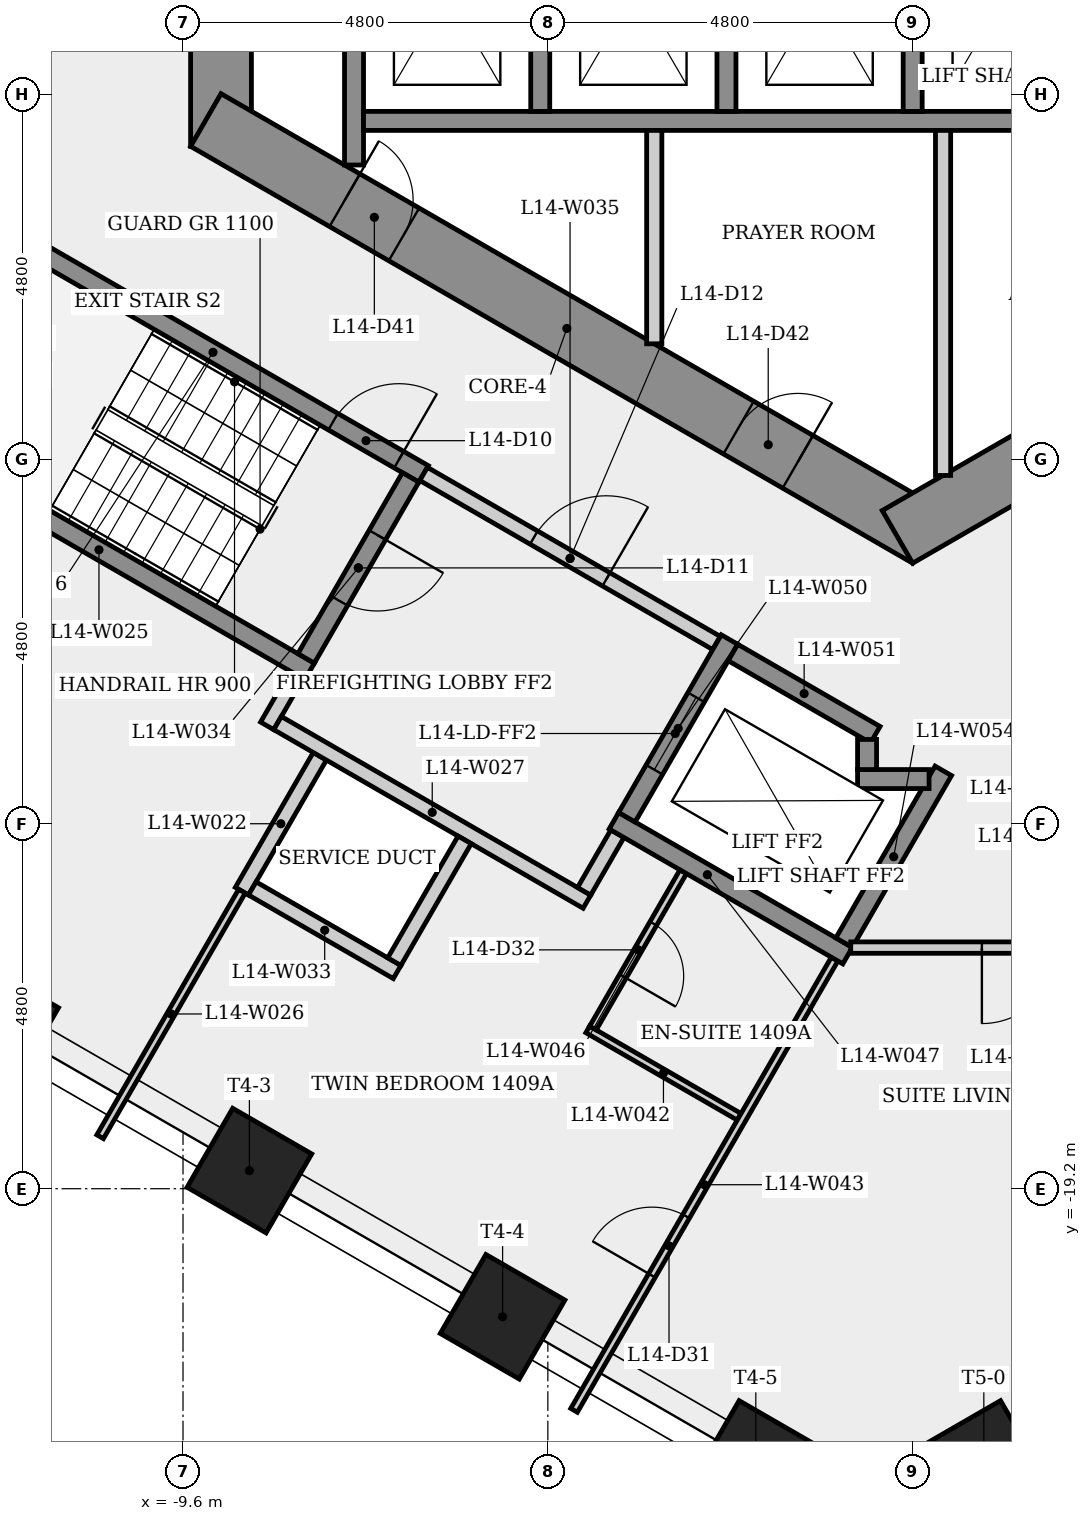
"""IFC4 building model, lengths in metres.
Left out: names, types, materials, properties, quantities, classifications, styles, units other than length and angle.
Written with IfcOpenShell. Run it as: python <this file> out.ifc"""

import sys

from ifc_helpers import new_model, si_unit, direction, frame, frame_2d, origin, origin_2d, place, context, subcontext, project, spatial, rectangle, extrude, element, fill, save


model = new_model("IFC4")
c1 = context("Model", 3, precision=1e-05, world=origin(), true_north=direction((0.0, 1.0)))
c2 = subcontext(c1, "Body", "Model", "MODEL_VIEW")
j1 = project(units=[si_unit("LENGTHUNIT", "METRE"), si_unit("PLANEANGLEUNIT", "RADIAN")], contexts=[c1])
p1 = place(None, origin())
s1 = spatial("IfcSite", under=j1, at=p1, CompositionType="ELEMENT")
p2 = place(p1, origin())
s2 = spatial("IfcBuilding", under=s1, at=p2, CompositionType="ELEMENT")
p3 = place(p2, frame((0.0, 0.0, 56.1)))
s3 = spatial("IfcBuildingStorey", under=s2, at=p3, CompositionType="ELEMENT", Elevation=56.1)
p4 = place(p3, frame((-9.1, 5.485, 0.0), z_axis=(0.0, 0.0, 1.0), x_axis=(0.0, -1.0, 0.0)))
e1 = element("IfcWall", 1, at=p4, inside=s3, PredefinedType="SHEAR", context=c2, shape_type="SweptSolid", body=[
    extrude(rectangle(XDim=10.97, YDim=0.8, at=frame_2d((5.485, 0.0))), origin(), (0.0, 0.0, 1.0), 3.4),
])
p5 = place(p4, frame((4.685, 0.0, 0.0)))
e2 = element("IfcOpeningElement", 2, at=p5, cuts=e1, PredefinedType="OPENING", context=c2, shape_type="SweptSolid", body=[
    extrude(rectangle(XDim=1.6, YDim=2.1, at=frame_2d((0.8, 1.05))), frame((0.0, 0.41, 0.0), z_axis=(0.0, -1.0, 0.0), x_axis=(1.0, 0.0, 0.0)), (0.0, 0.0, 1.0), 0.82),
])
p6 = place(p3, frame((-9.3, -5.138, 0.0), z_axis=(0.0, 0.0, 1.0), x_axis=(0.866023993627, -0.500002442456, 0.0)))
e3 = element("IfcWall", 3, at=p6, inside=s3, PredefinedType="SHEAR", context=c2, shape_type="SweptSolid", body=[
    extrude(rectangle(XDim=10.97, YDim=0.8, at=frame_2d((5.485, 0.0))), origin(), (0.0, 0.0, 1.0), 3.4),
])
p7 = place(p6, frame((2.11, 0.0, 0.0)))
e4 = element("IfcOpeningElement", 4, at=p7, cuts=e3, PredefinedType="OPENING", context=c2, shape_type="SweptSolid", body=[
    extrude(rectangle(XDim=0.9, YDim=2.1, at=frame_2d((0.45, 1.05))), frame((0.0, 0.41, 0.0), z_axis=(0.0, -1.0, 0.0), x_axis=(1.0, 0.0, 0.0)), (0.0, 0.0, 1.0), 0.82),
])
p8 = place(p6, frame((8.094, 0.0, 0.0)))
e5 = element("IfcOpeningElement", 5, at=p8, cuts=e3, PredefinedType="OPENING", context=c2, shape_type="SweptSolid", body=[
    extrude(rectangle(XDim=0.9, YDim=2.1, at=frame_2d((0.45, 1.05))), frame((0.0, 0.41, 0.0), z_axis=(0.0, -1.0, 0.0), x_axis=(1.0, 0.0, 0.0)), (0.0, 0.0, 1.0), 0.82),
])
p9 = place(p3, frame((-0.2, -10.623, 0.0), z_axis=(0.0, 0.0, 1.0), x_axis=(0.866023993627, 0.500002442456, 0.0)))
e6 = element("IfcWall", 6, at=p9, inside=s3, PredefinedType="SHEAR", context=c2, shape_type="SweptSolid", body=[
    extrude(rectangle(XDim=10.97, YDim=0.8, at=frame_2d((5.485, 0.0))), origin(), (0.0, 0.0, 1.0), 3.4),
])
p10 = place(p9, frame((6.877, 0.0, 0.0)))
e7 = element("IfcOpeningElement", 7, at=p10, cuts=e6, PredefinedType="OPENING", context=c2, shape_type="SweptSolid", body=[
    extrude(rectangle(XDim=0.9, YDim=2.1, at=frame_2d((0.45, 1.05))), frame((0.0, 0.41, 0.0), z_axis=(0.0, -1.0, 0.0), x_axis=(1.0, 0.0, 0.0)), (0.0, 0.0, 1.0), 0.82),
])
for number, where, z_axis, x_axis in (
    (8, (-12.058, -17.038, 0.0), (0.0, 0.0, 1.0), (-0.5, -0.866, 0.0)),
    (9, (-8.727, -18.962, 0.0), (0.0, 0.0, 1.0), (-0.5, -0.866, 0.0)),
    (10, (-5.395, -20.885, 0.0), (0.0, 0.0, 1.0), (-0.5, -0.866, 0.0)),
    (11, (-2.064, -22.808, 0.0), (0.0, 0.0, 1.0), (-0.5, -0.866, 0.0)),
    (12, (0.936, -22.808, 0.0), (0.0, 0.0, 1.0), (0.5, -0.866, 0.0)),
):
    element("IfcColumn", number, at=place(p3, frame(where, z_axis=z_axis, x_axis=x_axis)), inside=s3, PredefinedType="COLUMN", context=c2, shape_type="SweptSolid", body=[
        extrude(rectangle(XDim=1.2, YDim=1.2, at=origin_2d()), origin(), (0.0, 0.0, 1.0), 3.4),
    ])
p11 = place(p3, frame((-11.977, -6.595, 0.0), z_axis=(0.0, 0.0, 1.0), x_axis=(0.866025499775, -0.499999833739, 0.0)))
e13 = element("IfcWall", 13, at=p11, inside=s3, PredefinedType="SHEAR", context=c2, shape_type="SweptSolid", body=[
    extrude(rectangle(XDim=6.4, YDim=0.25, at=frame_2d((3.2, 0.0))), origin(), (0.0, 0.0, 1.0), 3.05),
])
p12 = place(p11, frame((5.025, 0.0, 0.0)))
e14 = element("IfcOpeningElement", 14, at=p12, cuts=e13, PredefinedType="OPENING", context=c2, shape_type="SweptSolid", body=[
    extrude(rectangle(XDim=1.0, YDim=2.1, at=frame_2d((0.5, 1.05))), frame((0.0, 0.135, 0.0), z_axis=(0.0, -1.0, 0.0), x_axis=(1.0, 0.0, 0.0)), (0.0, 0.0, 1.0), 0.27),
])
p13 = place(p3, frame((-8.825, -15.285, 0.0), z_axis=(0.0, 0.0, 1.0), x_axis=(0.499956128963, 0.866050731258, 0.0)))
e15 = element("IfcWall", 15, at=p13, inside=s3, PredefinedType="PLUMBINGWALL", context=c2, shape_type="SweptSolid", body=[
    extrude(rectangle(XDim=2.05, YDim=0.2, at=frame_2d((1.025, 0.0))), origin(), (0.0, 0.0, 1.0), 3.05),
])
p14 = place(p3, frame((-8.493, -13.11, 0.0), z_axis=(0.0, 0.0, 1.0), x_axis=(0.500067724834, 0.865986299303, 0.0)))
e16 = element("IfcWall", 16, at=p14, inside=s3, PredefinedType="PARTITIONING", context=c2, shape_type="SweptSolid", body=[
    extrude(rectangle(XDim=0.775, YDim=0.2, at=frame_2d((0.388, 0.0))), origin(), (0.0, 0.0, 1.0), 3.05),
])
p15 = place(p3, frame((-7.935, -12.393, 0.0), z_axis=(0.0, 0.0, 1.0), x_axis=(-0.866025499775, 0.499999833739, 0.0)))
e17 = element("IfcWall", 17, at=p15, inside=s3, PredefinedType="SHEAR", context=c2, shape_type="SweptSolid", body=[
    extrude(rectangle(XDim=6.4, YDim=0.25, at=frame_2d((3.2, 0.0))), origin(), (0.0, 0.0, 1.0), 3.05),
])
p16 = place(p3, frame((-10.69, -18.516, 0.0), z_axis=(0.0, 0.0, 1.0), x_axis=(0.49999626415, 0.866027560668, 0.0)))
e18 = element("IfcWall", 18, at=p16, inside=s3, PredefinedType="PARTITIONING", context=c2, shape_type="SweptSolid", body=[
    extrude(rectangle(XDim=3.73, YDim=0.1, at=frame_2d((1.865, 0.0))), origin(), (0.0, 0.0, 1.0), 3.05),
])
p17 = place(p3, frame((-8.356, -13.073, 0.0), z_axis=(0.0, 0.0, 1.0), x_axis=(0.866038532462, -0.499977259774, 0.0)))
e19 = element("IfcWall", 19, at=p17, inside=s3, PredefinedType="PARTITIONING", context=c2, shape_type="SweptSolid", body=[
    extrude(rectangle(XDim=4.7, YDim=0.2, at=frame_2d((2.35, 0.0))), origin(), (0.0, 0.0, 1.0), 3.05),
])
p18 = place(p3, frame((-7.35, -5.73, 0.0), z_axis=(0.0, 0.0, 1.0), x_axis=(0.0, 1.0, 0.0)))
e20 = element("IfcWall", 20, at=p18, inside=s3, PredefinedType="SHEAR", context=c2, shape_type="SweptSolid", body=[
    extrude(rectangle(XDim=4.055, YDim=0.25, at=frame_2d((2.028, 0.0))), origin(), (0.0, 0.0, 1.0), 3.05),
])
p19 = place(p3, frame((-6.783, -16.349, 0.0), z_axis=(0.0, 0.0, 1.0), x_axis=(-0.866008176907, 0.50002983664, 0.0)))
e21 = element("IfcWall", 21, at=p19, inside=s3, PredefinedType="PLUMBINGWALL", context=c2, shape_type="SweptSolid", body=[
    extrude(rectangle(XDim=2.2, YDim=0.2, at=frame_2d((1.1, 0.0))), origin(), (0.0, 0.0, 1.0), 3.05),
])
p20 = place(p3, frame((-6.605, -9.841, 0.0), z_axis=(0.0, 0.0, 1.0), x_axis=(-0.499996545922, -0.866027397988, 0.0)))
e22 = element("IfcWall", 22, at=p20, inside=s3, PredefinedType="SHEAR", context=c2, shape_type="SweptSolid", body=[
    extrude(rectangle(XDim=2.75, YDim=0.25, at=frame_2d((1.375, 0.0))), origin(), (0.0, 0.0, 1.0), 3.05),
])
p21 = place(p20, frame((0.875, 0.0, 0.0)))
e23 = element("IfcOpeningElement", 23, at=p21, cuts=e22, PredefinedType="OPENING", context=c2, shape_type="SweptSolid", body=[
    extrude(rectangle(XDim=1.0, YDim=2.1, at=frame_2d((0.5, 1.05))), frame((0.0, 0.135, 0.0), z_axis=(0.0, -1.0, 0.0), x_axis=(1.0, 0.0, 0.0)), (0.0, 0.0, 1.0), 0.27),
])
p22 = place(p3, frame((-6.435, -9.795, 0.0), z_axis=(0.0, 0.0, 1.0), x_axis=(0.866012907634, -0.500021643343, 0.0)))
e24 = element("IfcWall", 24, at=p22, inside=s3, PredefinedType="PARTITIONING", context=c2, shape_type="SweptSolid", body=[
    extrude(rectangle(XDim=4.45, YDim=0.2, at=frame_2d((2.225, 0.0))), origin(), (0.0, 0.0, 1.0), 3.05),
])
p23 = place(p22, frame((1.675, 0.0, 0.0)))
e25 = element("IfcOpeningElement", 25, at=p23, cuts=e24, PredefinedType="OPENING", context=c2, shape_type="SweptSolid", body=[
    extrude(rectangle(XDim=1.1, YDim=2.1, at=frame_2d((0.55, 1.05))), frame((0.0, 0.11, 0.0), z_axis=(0.0, -1.0, 0.0), x_axis=(1.0, 0.0, 0.0)), (0.0, 0.0, 1.0), 0.22),
])
p24 = place(p3, frame((-5.895, -14.61, 0.0), z_axis=(0.0, 0.0, 1.0), x_axis=(-0.500042316284, -0.866000971088, 0.0)))
e26 = element("IfcWall", 26, at=p24, inside=s3, PredefinedType="PLUMBINGWALL", context=c2, shape_type="SweptSolid", body=[
    extrude(rectangle(XDim=1.85, YDim=0.2, at=frame_2d((0.925, 0.0))), origin(), (0.0, 0.0, 1.0), 3.05),
])
p25 = place(p3, frame((-7.225, -5.15, 0.0), z_axis=(0.0, 0.0, 1.0), x_axis=(1.0, 0.0, 0.0)))
e27 = element("IfcWall", 27, at=p25, inside=s3, PredefinedType="SHEAR", context=c2, shape_type="SweptSolid", body=[
    extrude(rectangle(XDim=14.7, YDim=0.25, at=frame_2d((7.35, 0.0))), origin(), (0.0, 0.0, 1.0), 3.05),
])
p26 = place(p3, frame((-4.9, -1.925, 0.0), z_axis=(0.0, 0.0, 1.0), x_axis=(0.0, -1.0, 0.0)))
e28 = element("IfcWall", 28, at=p26, inside=s3, PredefinedType="SHEAR", context=c2, shape_type="SweptSolid", body=[
    extrude(rectangle(XDim=3.1, YDim=0.25, at=frame_2d((1.55, 0.0))), origin(), (0.0, 0.0, 1.0), 3.4),
])
p27 = place(p3, frame((-4.275, -17.104, 0.0), z_axis=(0.0, 0.0, 1.0), x_axis=(0.866053019151, -0.499952165731, 0.0)))
e29 = element("IfcWall", 29, at=p27, inside=s3, PredefinedType="PARTITIONING", context=c2, shape_type="SweptSolid", body=[
    extrude(rectangle(XDim=2.3, YDim=0.1, at=frame_2d((1.15, 0.0))), origin(), (0.0, 0.0, 1.0), 3.05),
])
p28 = place(p3, frame((-4.455, -22.116, 0.0), z_axis=(0.0, 0.0, 1.0), x_axis=(0.499984476993, 0.866034365811, 0.0)))
e30 = element("IfcWall", 30, at=p28, inside=s3, PredefinedType="PARTITIONING", context=c2, shape_type="SweptSolid", body=[
    extrude(rectangle(XDim=6.856, YDim=0.1, at=frame_2d((3.428, 0.0))), origin(), (0.0, 0.0, 1.0), 3.05),
])
p29 = place(p28, frame((2.048, 0.0, 0.0)))
e31 = element("IfcOpeningElement", 31, at=p29, cuts=e30, PredefinedType="OPENING", context=c2, shape_type="SweptSolid", body=[
    extrude(rectangle(XDim=0.9, YDim=2.1, at=frame_2d((0.45, 1.05))), frame((0.0, 0.06, 0.0), z_axis=(0.0, -1.0, 0.0), x_axis=(1.0, 0.0, 0.0)), (0.0, 0.0, 1.0), 0.12),
])
p30 = place(p3, frame((-3.885, -14.529, 0.0), z_axis=(0.0, 0.0, 1.0), x_axis=(-0.499859285417, -0.866106630146, 0.0)))
e32 = element("IfcWall", 32, at=p30, inside=s3, PredefinedType="PARTITIONING", context=c2, shape_type="SweptSolid", body=[
    extrude(rectangle(XDim=0.875, YDim=0.2, at=frame_2d((0.438, 0.0))), origin(), (0.0, 0.0, 1.0), 3.05),
])
p31 = place(p3, frame((-3.4, -5.275, 0.0), z_axis=(0.0, 0.0, 1.0), x_axis=(0.0, -1.0, 0.0)))
e33 = element("IfcWall", 33, at=p31, inside=s3, PredefinedType="PARTITIONING", context=c2, shape_type="SweptSolid", body=[
    extrude(rectangle(XDim=2.808, YDim=0.2, at=frame_2d((1.404, 0.0))), origin(), (0.0, 0.0, 1.0), 3.05),
])
p32 = place(p3, frame((-3.019, -15.029, 0.0), z_axis=(0.0, 0.0, 1.0), x_axis=(-0.499986429846, -0.866033238375, 0.0)))
e34 = element("IfcWall", 34, at=p32, inside=s3, PredefinedType="PARTITIONING", context=c2, shape_type="SweptSolid", body=[
    extrude(rectangle(XDim=2.375, YDim=0.1, at=frame_2d((1.188, 0.0))), origin(), (0.0, 0.0, 1.0), 3.05),
])
p33 = place(p32, frame((0.788, 0.0, 0.0)))
e35 = element("IfcOpeningElement", 35, at=p33, cuts=e34, PredefinedType="OPENING", context=c2, shape_type="SweptSolid", body=[
    extrude(rectangle(XDim=0.8, YDim=2.1, at=frame_2d((0.4, 1.05))), frame((0.0, 0.06, 0.0), z_axis=(0.0, -1.0, 0.0), x_axis=(1.0, 0.0, 0.0)), (0.0, 0.0, 1.0), 0.12),
])
p34 = place(p3, frame((-3.931, -14.358, 0.0), z_axis=(0.0, 0.0, 1.0), x_axis=(0.8660424351, -0.499970499736, 0.0)))
e36 = element("IfcWall", 36, at=p34, inside=s3, PredefinedType="SHEAR", context=c2, shape_type="SweptSolid", body=[
    extrude(rectangle(XDim=3.55, YDim=0.25, at=frame_2d((1.775, 0.0))), origin(), (0.0, 0.0, 1.0), 3.05),
])
p35 = place(p3, frame((-2.41, -11.974, 0.0), z_axis=(0.0, 0.0, 1.0), x_axis=(-0.50000943426, -0.866019956843, 0.0)))
e37 = element("IfcWall", 37, at=p35, inside=s3, PredefinedType="SHEAR", context=c2, shape_type="SweptSolid", body=[
    extrude(rectangle(XDim=2.7, YDim=0.25, at=frame_2d((1.35, 0.0))), origin(), (0.0, 0.0, 1.0), 3.05),
])
p36 = place(p35, frame((0.877, 0.0, 0.0)))
e38 = element("IfcOpeningElement", 38, at=p36, cuts=e37, PredefinedType="OPENING", context=c2, shape_type="SweptSolid", body=[
    extrude(rectangle(XDim=1.1, YDim=2.1, at=frame_2d((0.55, 1.05))), frame((0.0, 0.135, 0.0), z_axis=(0.0, -1.0, 0.0), x_axis=(1.0, 0.0, 0.0)), (0.0, 0.0, 1.0), 0.27),
])
p37 = place(p3, frame((-2.364, -12.145, 0.0), z_axis=(0.0, 0.0, 1.0), x_axis=(0.86603892542, -0.499976579108, 0.0)))
e39 = element("IfcWall", 39, at=p37, inside=s3, PredefinedType="SHEAR", context=c2, shape_type="SweptSolid", body=[
    extrude(rectangle(XDim=2.162, YDim=0.25, at=frame_2d((1.081, 0.0))), origin(), (0.0, 0.0, 1.0), 3.05),
])
p38 = place(p3, frame((-2.45, -1.925, 0.0), z_axis=(0.0, 0.0, 1.0), x_axis=(0.0, -1.0, 0.0)))
e40 = element("IfcWall", 40, at=p38, inside=s3, PredefinedType="SHEAR", context=c2, shape_type="SweptSolid", body=[
    extrude(rectangle(XDim=3.1, YDim=0.25, at=frame_2d((1.55, 0.0))), origin(), (0.0, 0.0, 1.0), 3.4),
])
p39 = place(p3, frame((-0.902, -15.962, 0.0), z_axis=(0.0, 0.0, 1.0), x_axis=(0.499981517636, 0.866036074319, 0.0)))
e41 = element("IfcWall", 41, at=p39, inside=s3, PredefinedType="SHEAR", context=c2, shape_type="SweptSolid", body=[
    extrude(rectangle(XDim=2.61, YDim=0.25, at=frame_2d((1.305, 0.0))), origin(), (0.0, 0.0, 1.0), 3.05),
])
p40 = place(p3, frame((-0.725, -13.81, 0.0), z_axis=(0.0, 0.0, 1.0), x_axis=(1.0, 0.0, 0.0)))
e42 = element("IfcWall", 42, at=p40, inside=s3, PredefinedType="SHEAR", context=c2, shape_type="SweptSolid", body=[
    extrude(rectangle(XDim=0.941, YDim=0.25, at=frame_2d((0.47, 0.0))), origin(), (0.0, 0.0, 1.0), 3.4),
])
p41 = place(p3, frame((-0.6, -13.289, 0.0), z_axis=(0.0, 0.0, 1.0), x_axis=(0.0, -1.0, 0.0)))
e43 = element("IfcWall", 43, at=p41, inside=s3, PredefinedType="SHEAR", context=c2, shape_type="SweptSolid", body=[
    extrude(rectangle(XDim=0.396, YDim=0.25, at=frame_2d((0.198, 0.0))), origin(), (0.0, 0.0, 1.0), 3.4),
])
p42 = place(p3, frame((0.0, -1.925, 0.0), z_axis=(0.0, 0.0, 1.0), x_axis=(0.0, -1.0, 0.0)))
e44 = element("IfcWall", 44, at=p42, inside=s3, PredefinedType="SHEAR", context=c2, shape_type="SweptSolid", body=[
    extrude(rectangle(XDim=3.1, YDim=0.25, at=frame_2d((1.55, 0.0))), origin(), (0.0, 0.0, 1.0), 3.4),
])
p43 = place(p3, frame((0.4, -5.275, 0.0), z_axis=(0.0, 0.0, 1.0), x_axis=(0.0, -1.0, 0.0)))
e45 = element("IfcWall", 45, at=p43, inside=s3, PredefinedType="PARTITIONING", context=c2, shape_type="SweptSolid", body=[
    extrude(rectangle(XDim=4.54, YDim=0.2, at=frame_2d((2.27, 0.0))), origin(), (0.0, 0.0, 1.0), 3.05),
])
p44 = place(p3, frame((3.636, -16.028, 0.0), z_axis=(0.0, 0.0, 1.0), x_axis=(-1.0, 0.0, 0.0)))
e46 = element("IfcWall", 46, at=p44, inside=s3, PredefinedType="PARTITIONING", context=c2, shape_type="SweptSolid", body=[
    extrude(rectangle(XDim=4.451, YDim=0.15, at=frame_2d((2.225, 0.0))), origin(), (0.0, 0.0, 1.0), 3.05),
])
p45 = place(p44, frame((1.725, 0.0, 0.0)))
e47 = element("IfcOpeningElement", 47, at=p45, cuts=e46, PredefinedType="OPENING", context=c2, shape_type="SweptSolid", body=[
    extrude(rectangle(XDim=1.0, YDim=2.1, at=frame_2d((0.5, 1.05))), frame((0.0, 0.085, 0.0), z_axis=(0.0, -1.0, 0.0), x_axis=(1.0, 0.0, 0.0)), (0.0, 0.0, 1.0), 0.17),
])
p46 = place(p12, origin())
e48 = element("IfcDoor", 48, at=p46, inside=s3, OperationType="SINGLE_SWING_RIGHT", PredefinedType="DOOR", context=c2, shape_type="SweptSolid", body=[
    extrude(rectangle(XDim=1.0, YDim=2.1, at=frame_2d((0.5, 1.05))), frame((0.0, 0.025, 0.0), z_axis=(0.0, -1.0, 0.0), x_axis=(1.0, 0.0, 0.0)), (0.0, 0.0, 1.0), 0.05),
])
fill(e14, e48)
p47 = place(p21, origin())
e49 = element("IfcDoor", 49, at=p47, inside=s3, OperationType="SINGLE_SWING_LEFT", PredefinedType="DOOR", context=c2, shape_type="SweptSolid", body=[
    extrude(rectangle(XDim=1.0, YDim=2.1, at=frame_2d((0.5, 1.05))), frame((0.0, 0.025, 0.0), z_axis=(0.0, -1.0, 0.0), x_axis=(1.0, 0.0, 0.0)), (0.0, 0.0, 1.0), 0.05),
])
fill(e23, e49)
p48 = place(p23, origin())
e50 = element("IfcDoor", 50, at=p48, inside=s3, OperationType="SINGLE_SWING_RIGHT", PredefinedType="DOOR", context=c2, shape_type="SweptSolid", body=[
    extrude(rectangle(XDim=1.1, YDim=2.1, at=frame_2d((0.55, 1.05))), frame((0.0, 0.025, 0.0), z_axis=(0.0, -1.0, 0.0), x_axis=(1.0, 0.0, 0.0)), (0.0, 0.0, 1.0), 0.05),
])
fill(e25, e50)
p49 = place(p36, origin())
e51 = element("IfcDoor", 51, at=p49, inside=s3, OperationType="SLIDING_TO_LEFT", PredefinedType="DOOR", context=c2, shape_type="SweptSolid", body=[
    extrude(rectangle(XDim=1.1, YDim=2.1, at=frame_2d((0.55, 1.05))), frame((0.0, 0.025, 0.0), z_axis=(0.0, -1.0, 0.0), x_axis=(1.0, 0.0, 0.0)), (0.0, 0.0, 1.0), 0.05),
])
fill(e38, e51)
p50 = place(p45, origin())
e52 = element("IfcDoor", 52, at=p50, inside=s3, OperationType="SINGLE_SWING_RIGHT", PredefinedType="DOOR", context=c2, shape_type="SweptSolid", body=[
    extrude(rectangle(XDim=1.0, YDim=2.1, at=frame_2d((0.5, 1.05))), frame((0.0, 0.025, 0.0), z_axis=(0.0, -1.0, 0.0), x_axis=(1.0, 0.0, 0.0)), (0.0, 0.0, 1.0), 0.05),
])
fill(e47, e52)
p51 = place(p29, origin())
e53 = element("IfcDoor", 53, at=p51, inside=s3, OperationType="SINGLE_SWING_LEFT", PredefinedType="DOOR", context=c2, shape_type="SweptSolid", body=[
    extrude(rectangle(XDim=0.9, YDim=2.1, at=frame_2d((0.45, 1.05))), frame((0.0, 0.025, 0.0), z_axis=(0.0, -1.0, 0.0), x_axis=(1.0, 0.0, 0.0)), (0.0, 0.0, 1.0), 0.05),
])
fill(e31, e53)
p52 = place(p33, origin())
e54 = element("IfcDoor", 54, at=p52, inside=s3, OperationType="SINGLE_SWING_RIGHT", PredefinedType="DOOR", context=c2, shape_type="SweptSolid", body=[
    extrude(rectangle(XDim=0.8, YDim=2.1, at=frame_2d((0.4, 1.05))), frame((0.0, 0.025, 0.0), z_axis=(0.0, -1.0, 0.0), x_axis=(1.0, 0.0, 0.0)), (0.0, 0.0, 1.0), 0.05),
])
fill(e35, e54)
p53 = place(p7, origin())
e55 = element("IfcDoor", 55, at=p53, inside=s3, OperationType="SINGLE_SWING_LEFT", PredefinedType="DOOR", context=c2, shape_type="SweptSolid", body=[
    extrude(rectangle(XDim=0.9, YDim=2.1, at=frame_2d((0.45, 1.05))), frame((0.0, 0.025, 0.0), z_axis=(0.0, -1.0, 0.0), x_axis=(1.0, 0.0, 0.0)), (0.0, 0.0, 1.0), 0.05),
])
fill(e4, e55)
p54 = place(p8, origin())
e56 = element("IfcDoor", 56, at=p54, inside=s3, OperationType="SINGLE_SWING_RIGHT", PredefinedType="DOOR", context=c2, shape_type="SweptSolid", body=[
    extrude(rectangle(XDim=0.9, YDim=2.1, at=frame_2d((0.45, 1.05))), frame((0.0, 0.025, 0.0), z_axis=(0.0, -1.0, 0.0), x_axis=(1.0, 0.0, 0.0)), (0.0, 0.0, 1.0), 0.05),
])
fill(e5, e56)
save(model, sys.argv[1])
